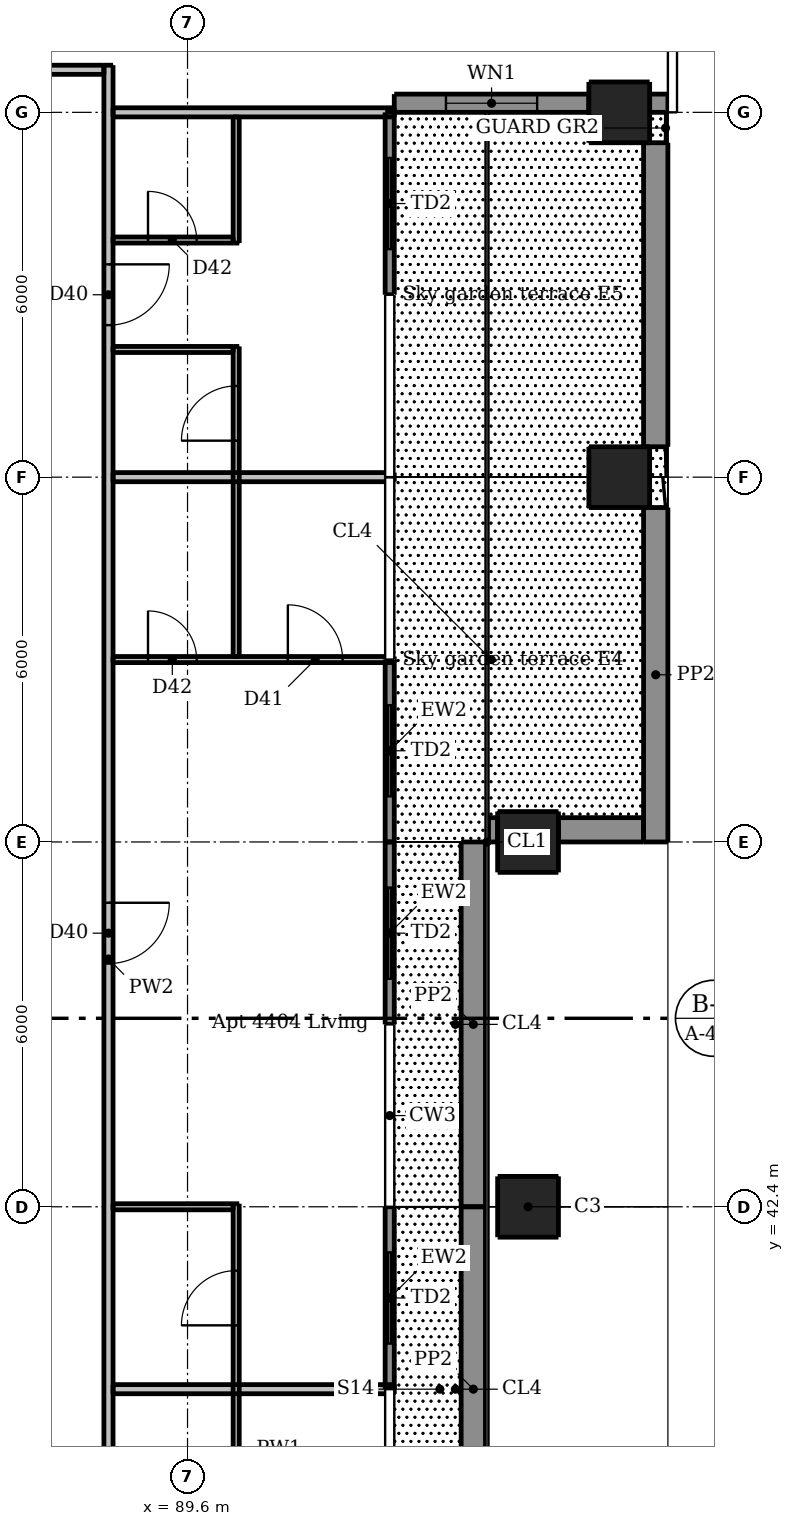
"""IFC4 building model, lengths in metres.
Left out: names, types, materials, properties, quantities, classifications, styles, units other than length and angle.
Written with IfcOpenShell. Run it as: python <this file> out.ifc"""

import sys

from ifc_helpers import new_model, si_unit, direction, frame, frame_2d, origin, origin_2d, place, context, subcontext, project, spatial, rectangle, extrude, element, fill, save


model = new_model("IFC4")
c1 = context("Model", 3, precision=1e-05, world=origin(), true_north=direction((0.0, 1.0)))
c2 = subcontext(c1, "Body", "Model", "MODEL_VIEW")
j1 = project(units=[si_unit("LENGTHUNIT", "METRE"), si_unit("PLANEANGLEUNIT", "RADIAN")], contexts=[c1])
p1 = place(None, origin())
s1 = spatial("IfcSite", under=j1, at=p1, CompositionType="ELEMENT")
p2 = place(p1, origin())
s2 = spatial("IfcBuilding", under=s1, at=p2, CompositionType="ELEMENT")
p3 = place(p2, frame((0.0, 0.0, 164.8)))
s3 = spatial("IfcBuildingStorey", under=s2, at=p3, CompositionType="ELEMENT", Elevation=164.8)
for number, where, z_axis, x_axis in (
    (1, (95.2, 42.4, 0.0), (0.0, 0.0, 1.0), (1.0, 0.0, 0.0)),
    (2, (95.2, 48.4, 0.0), (0.0, 0.0, 1.0), (1.0, 0.0, 0.0)),
    (3, (96.7, 54.4, 0.0), (0.0, 0.0, 1.0), (1.0, 0.0, 0.0)),
):
    element("IfcColumn", number, at=place(p3, frame(where, z_axis=z_axis, x_axis=x_axis)), inside=s3, PredefinedType="COLUMN", context=c2, shape_type="SweptSolid", body=[
        extrude(rectangle(XDim=1.0, YDim=1.0, at=origin_2d()), origin(), (0.0, 0.0, 1.0), 3.3),
    ])
p4 = place(p3, frame((96.7, 60.4, 0.0), z_axis=(0.0, 0.0, 1.0), x_axis=(1.0, 0.0, 0.0)))
e4 = element("IfcColumn", 4, at=p4, inside=s3, PredefinedType="COLUMN", context=c2, shape_type="SweptSolid", body=[
    extrude(rectangle(XDim=1.0, YDim=1.0, at=origin_2d()), origin(), (0.0, 0.0, 1.0), 3.05),
])
p5 = place(p3, frame((93.0, 60.55, 0.0), z_axis=(0.0, 0.0, 1.0), x_axis=(1.0, 0.0, 0.0)))
e5 = element("IfcWall", 5, at=p5, inside=s3, PredefinedType="SOLIDWALL", context=c2, shape_type="SweptSolid", body=[
    extrude(rectangle(XDim=3.2, YDim=0.3, at=frame_2d((1.6, 0.0))), origin(), (0.0, 0.0, 1.0), 3.05),
])
p6 = place(p5, frame((0.85, 0.0, 0.9)))
e6 = element("IfcOpeningElement", 6, at=p6, cuts=e5, PredefinedType="OPENING", context=c2, shape_type="SweptSolid", body=[
    extrude(rectangle(XDim=1.5, YDim=1.5, at=frame_2d((0.75, 0.75))), frame((0.0, 0.16, 0.0), z_axis=(0.0, -1.0, 0.0), x_axis=(1.0, 0.0, 0.0)), (0.0, 0.0, 1.0), 0.32),
])
p7 = place(p3, frame((97.2, 60.55, 0.0), z_axis=(0.0, 0.0, 1.0), x_axis=(1.0, 0.0, 0.0)))
e7 = element("IfcWall", 7, at=p7, inside=s3, PredefinedType="SOLIDWALL", context=c2, shape_type="SweptSolid", body=[
    extrude(rectangle(XDim=0.3, YDim=0.3, at=frame_2d((0.15, 0.0))), origin(), (0.0, 0.0, 1.0), 3.05),
])
p8 = place(p3, frame((92.925, 39.4, 0.0), z_axis=(0.0, 0.0, 1.0), x_axis=(0.0, 1.0, 0.0)))
e8 = element("IfcWall", 8, at=p8, inside=s3, PredefinedType="SOLIDWALL", context=c2, shape_type="SweptSolid", body=[
    extrude(rectangle(XDim=3.0, YDim=0.15, at=frame_2d((1.5, 0.0))), origin(), (0.0, 0.0, 1.0), 3.05),
])
p9 = place(p8, frame((0.75, 0.0, 0.0)))
e9 = element("IfcOpeningElement", 9, at=p9, cuts=e8, PredefinedType="OPENING", context=c2, shape_type="SweptSolid", body=[
    extrude(rectangle(XDim=1.5, YDim=2.4, at=frame_2d((0.75, 1.2))), frame((0.0, 0.085, 0.0), z_axis=(0.0, -1.0, 0.0), x_axis=(1.0, 0.0, 0.0)), (0.0, 0.0, 1.0), 0.17),
])
p10 = place(p3, frame((92.925, 45.4, 0.0), z_axis=(0.0, 0.0, 1.0), x_axis=(0.0, 1.0, 0.0)))
e10 = element("IfcWall", 10, at=p10, inside=s3, PredefinedType="SOLIDWALL", context=c2, shape_type="SweptSolid", body=[
    extrude(rectangle(XDim=3.0, YDim=0.15, at=frame_2d((1.5, 0.0))), origin(), (0.0, 0.0, 1.0), 3.05),
])
p11 = place(p10, frame((0.75, 0.0, 0.0)))
e11 = element("IfcOpeningElement", 11, at=p11, cuts=e10, PredefinedType="OPENING", context=c2, shape_type="SweptSolid", body=[
    extrude(rectangle(XDim=1.5, YDim=2.4, at=frame_2d((0.75, 1.2))), frame((0.0, 0.085, 0.0), z_axis=(0.0, -1.0, 0.0), x_axis=(1.0, 0.0, 0.0)), (0.0, 0.0, 1.0), 0.17),
])
p12 = place(p3, frame((92.925, 48.4, 0.0), z_axis=(0.0, 0.0, 1.0), x_axis=(0.0, 1.0, 0.0)))
e12 = element("IfcWall", 12, at=p12, inside=s3, PredefinedType="SOLIDWALL", context=c2, shape_type="SweptSolid", body=[
    extrude(rectangle(XDim=3.0, YDim=0.15, at=frame_2d((1.5, 0.0))), origin(), (0.0, 0.0, 1.0), 3.05),
])
p13 = place(p12, frame((0.75, 0.0, 0.0)))
e13 = element("IfcOpeningElement", 13, at=p13, cuts=e12, PredefinedType="OPENING", context=c2, shape_type="SweptSolid", body=[
    extrude(rectangle(XDim=1.5, YDim=2.4, at=frame_2d((0.75, 1.2))), frame((0.0, 0.085, 0.0), z_axis=(0.0, -1.0, 0.0), x_axis=(1.0, 0.0, 0.0)), (0.0, 0.0, 1.0), 0.17),
])
p14 = place(p3, frame((92.925, 57.4, 0.0), z_axis=(0.0, 0.0, 1.0), x_axis=(0.0, 1.0, 0.0)))
e14 = element("IfcWall", 14, at=p14, inside=s3, PredefinedType="SOLIDWALL", context=c2, shape_type="SweptSolid", body=[
    extrude(rectangle(XDim=3.0, YDim=0.15, at=frame_2d((1.5, 0.0))), origin(), (0.0, 0.0, 1.0), 3.05),
])
p15 = place(p14, frame((0.75, 0.0, 0.0)))
e15 = element("IfcOpeningElement", 15, at=p15, cuts=e14, PredefinedType="OPENING", context=c2, shape_type="SweptSolid", body=[
    extrude(rectangle(XDim=1.5, YDim=2.4, at=frame_2d((0.75, 1.2))), frame((0.0, 0.085, 0.0), z_axis=(0.0, -1.0, 0.0), x_axis=(1.0, 0.0, 0.0)), (0.0, 0.0, 1.0), 0.17),
])
for number, where, z_axis, x_axis in (
    (16, (94.3, 36.4, 0.03), (0.0, 0.0, 1.0), (0.0, 1.0, 0.0)),
    (17, (94.3, 42.4, 0.03), (0.0, 0.0, 1.0), (0.0, 1.0, 0.0)),
):
    element("IfcWall", number, at=place(p3, frame(where, z_axis=z_axis, x_axis=x_axis)), inside=s3, PredefinedType="PARAPET", context=c2, shape_type="SweptSolid", body=[
        extrude(rectangle(XDim=6.0, YDim=0.4, at=frame_2d((3.0, 0.0))), origin(), (0.0, 0.0, 1.0), 1.1),
    ])
p16 = place(p3, frame((97.3, 48.4, 0.03), z_axis=(0.0, 0.0, 1.0), x_axis=(0.0, 1.0, 0.0)))
e18 = element("IfcWall", 18, at=p16, inside=s3, PredefinedType="PARAPET", context=c2, shape_type="SweptSolid", body=[
    extrude(rectangle(XDim=5.5, YDim=0.4, at=frame_2d((2.75, 0.0))), origin(), (0.0, 0.0, 1.0), 1.1),
])
p17 = place(p3, frame((94.55, 48.6, 0.03), z_axis=(0.0, 0.0, 1.0), x_axis=(1.0, 0.0, 0.0)))
e19 = element("IfcWall", 19, at=p17, inside=s3, PredefinedType="PARAPET", context=c2, shape_type="SweptSolid", body=[
    extrude(rectangle(XDim=0.15, YDim=0.4, at=frame_2d((0.075, 0.0))), origin(), (0.0, 0.0, 1.0), 1.1),
])
p18 = place(p3, frame((95.7, 48.6, 0.03), z_axis=(0.0, 0.0, 1.0), x_axis=(1.0, 0.0, 0.0)))
e20 = element("IfcWall", 20, at=p18, inside=s3, PredefinedType="PARAPET", context=c2, shape_type="SweptSolid", body=[
    extrude(rectangle(XDim=1.4, YDim=0.4, at=frame_2d((0.7, 0.0))), origin(), (0.0, 0.0, 1.0), 1.1),
])
p19 = place(p3, frame((97.3, 54.9, 0.03), z_axis=(0.0, 0.0, 1.0), x_axis=(0.0, 1.0, 0.0)))
e21 = element("IfcWall", 21, at=p19, inside=s3, PredefinedType="PARAPET", context=c2, shape_type="SweptSolid", body=[
    extrude(rectangle(XDim=5.0, YDim=0.4, at=frame_2d((2.5, 0.0))), origin(), (0.0, 0.0, 1.0), 1.1),
])
p20 = place(p3, frame((90.4, 33.45, 0.0), z_axis=(0.0, 0.0, 1.0), x_axis=(0.0, 1.0, 0.0)))
e22 = element("IfcWall", 22, at=p20, inside=s3, PredefinedType="PARTITIONING", context=c2, shape_type="SweptSolid", body=[
    extrude(rectangle(XDim=9.0, YDim=0.1, at=frame_2d((4.5, 0.0))), origin(), (0.0, 0.0, 1.0), 3.05),
])
p21 = place(p20, frame((3.75, 0.0, 0.0)))
e23 = element("IfcOpeningElement", 23, at=p21, cuts=e22, PredefinedType="OPENING", context=c2, shape_type="SweptSolid", body=[
    extrude(rectangle(XDim=0.8, YDim=2.1, at=frame_2d((0.4, 1.05))), frame((0.0, 0.06, 0.0), z_axis=(0.0, -1.0, 0.0), x_axis=(1.0, 0.0, 0.0)), (0.0, 0.0, 1.0), 0.12),
])
p22 = place(p20, frame((7.0, 0.0, 0.0)))
e24 = element("IfcOpeningElement", 24, at=p22, cuts=e22, PredefinedType="OPENING", context=c2, shape_type="SweptSolid", body=[
    extrude(rectangle(XDim=0.9, YDim=2.1, at=frame_2d((0.45, 1.05))), frame((0.0, 0.06, 0.0), z_axis=(0.0, -1.0, 0.0), x_axis=(1.0, 0.0, 0.0)), (0.0, 0.0, 1.0), 0.12),
])
p23 = place(p3, frame((90.4, 51.45, 0.0), z_axis=(0.0, 0.0, 1.0), x_axis=(0.0, 1.0, 0.0)))
e25 = element("IfcWall", 25, at=p23, inside=s3, PredefinedType="PARTITIONING", context=c2, shape_type="SweptSolid", body=[
    extrude(rectangle(XDim=5.1, YDim=0.1, at=frame_2d((2.55, 0.0))), origin(), (0.0, 0.0, 1.0), 3.05),
])
p24 = place(p23, frame((3.55, 0.0, 0.0)))
e26 = element("IfcOpeningElement", 26, at=p24, cuts=e25, PredefinedType="OPENING", context=c2, shape_type="SweptSolid", body=[
    extrude(rectangle(XDim=0.9, YDim=2.1, at=frame_2d((0.45, 1.05))), frame((0.0, 0.06, 0.0), z_axis=(0.0, -1.0, 0.0), x_axis=(1.0, 0.0, 0.0)), (0.0, 0.0, 1.0), 0.12),
])
p25 = place(p3, frame((90.4, 58.25, 0.0), z_axis=(0.0, 0.0, 1.0), x_axis=(0.0, 1.0, 0.0)))
e27 = element("IfcWall", 27, at=p25, inside=s3, PredefinedType="PARTITIONING", context=c2, shape_type="SweptSolid", body=[
    extrude(rectangle(XDim=2.075, YDim=0.1, at=frame_2d((1.038, 0.0))), origin(), (0.0, 0.0, 1.0), 3.05),
])
p26 = place(p3, frame((88.375, 58.3, 0.0), z_axis=(0.0, 0.0, 1.0), x_axis=(1.0, 0.0, 0.0)))
e28 = element("IfcWall", 28, at=p26, inside=s3, PredefinedType="PARTITIONING", context=c2, shape_type="SweptSolid", body=[
    extrude(rectangle(XDim=1.975, YDim=0.1, at=frame_2d((0.988, 0.0))), origin(), (0.0, 0.0, 1.0), 3.05),
])
p27 = place(p26, frame((0.575, 0.0, 0.0)))
e29 = element("IfcOpeningElement", 29, at=p27, cuts=e28, PredefinedType="OPENING", context=c2, shape_type="SweptSolid", body=[
    extrude(rectangle(XDim=0.8, YDim=2.1, at=frame_2d((0.4, 1.05))), frame((0.0, 0.06, 0.0), z_axis=(0.0, -1.0, 0.0), x_axis=(1.0, 0.0, 0.0)), (0.0, 0.0, 1.0), 0.12),
])
p28 = place(p3, frame((88.375, 56.5, 0.0), z_axis=(0.0, 0.0, 1.0), x_axis=(1.0, 0.0, 0.0)))
e30 = element("IfcWall", 30, at=p28, inside=s3, PredefinedType="PARTITIONING", context=c2, shape_type="SweptSolid", body=[
    extrude(rectangle(XDim=1.975, YDim=0.1, at=frame_2d((0.988, 0.0))), origin(), (0.0, 0.0, 1.0), 3.05),
])
p29 = place(p3, frame((88.375, 51.4, 0.0), z_axis=(0.0, 0.0, 1.0), x_axis=(1.0, 0.0, 0.0)))
e31 = element("IfcWall", 31, at=p29, inside=s3, PredefinedType="PARTITIONING", context=c2, shape_type="SweptSolid", body=[
    extrude(rectangle(XDim=4.625, YDim=0.1, at=frame_2d((2.312, 0.0))), origin(), (0.0, 0.0, 1.0), 3.05),
])
p30 = place(p29, frame((2.875, 0.0, 0.0)))
e32 = element("IfcOpeningElement", 32, at=p30, cuts=e31, PredefinedType="OPENING", context=c2, shape_type="SweptSolid", body=[
    extrude(rectangle(XDim=0.9, YDim=2.1, at=frame_2d((0.45, 1.05))), frame((0.0, 0.06, 0.0), z_axis=(0.0, -1.0, 0.0), x_axis=(1.0, 0.0, 0.0)), (0.0, 0.0, 1.0), 0.12),
])
p31 = place(p29, frame((0.575, 0.0, 0.0)))
e33 = element("IfcOpeningElement", 33, at=p31, cuts=e31, PredefinedType="OPENING", context=c2, shape_type="SweptSolid", body=[
    extrude(rectangle(XDim=0.8, YDim=2.1, at=frame_2d((0.4, 1.05))), frame((0.0, 0.06, 0.0), z_axis=(0.0, -1.0, 0.0), x_axis=(1.0, 0.0, 0.0)), (0.0, 0.0, 1.0), 0.12),
])
p32 = place(p3, frame((88.375, 42.4, 0.0), z_axis=(0.0, 0.0, 1.0), x_axis=(1.0, 0.0, 0.0)))
e34 = element("IfcWall", 34, at=p32, inside=s3, PredefinedType="PARTITIONING", context=c2, shape_type="SweptSolid", body=[
    extrude(rectangle(XDim=1.975, YDim=0.1, at=frame_2d((0.988, 0.0))), origin(), (0.0, 0.0, 1.0), 2.59),
])
p33 = place(p3, frame((88.3, 61.175, 0.0), z_axis=(0.0, 0.0, 1.0), x_axis=(0.0, -1.0, 0.0)))
e35 = element("IfcWall", 35, at=p33, inside=s3, PredefinedType="PARTITIONING", context=c2, shape_type="SweptSolid", body=[
    extrude(rectangle(XDim=29.4, YDim=0.15, at=frame_2d((14.7, 0.0))), origin(), (0.0, 0.0, 1.0), 3.05),
])
p34 = place(p33, frame((28.125, 0.0, 0.0)))
e36 = element("IfcOpeningElement", 36, at=p34, cuts=e35, PredefinedType="OPENING", context=c2, shape_type="SweptSolid", body=[
    extrude(rectangle(XDim=1.0, YDim=2.1, at=frame_2d((0.5, 1.05))), frame((0.0, 0.085, 0.0), z_axis=(0.0, -1.0, 0.0), x_axis=(1.0, 0.0, 0.0)), (0.0, 0.0, 1.0), 0.17),
])
p35 = place(p33, frame((13.775, 0.0, 0.0)))
e37 = element("IfcOpeningElement", 37, at=p35, cuts=e35, PredefinedType="OPENING", context=c2, shape_type="SweptSolid", body=[
    extrude(rectangle(XDim=1.0, YDim=2.1, at=frame_2d((0.5, 1.05))), frame((0.0, 0.085, 0.0), z_axis=(0.0, -1.0, 0.0), x_axis=(1.0, 0.0, 0.0)), (0.0, 0.0, 1.0), 0.17),
])
p36 = place(p33, frame((3.275, 0.0, 0.0)))
e38 = element("IfcOpeningElement", 38, at=p36, cuts=e35, PredefinedType="OPENING", context=c2, shape_type="SweptSolid", body=[
    extrude(rectangle(XDim=1.0, YDim=2.1, at=frame_2d((0.5, 1.05))), frame((0.0, 0.085, 0.0), z_axis=(0.0, -1.0, 0.0), x_axis=(1.0, 0.0, 0.0)), (0.0, 0.0, 1.0), 0.17),
])
p37 = place(p3, frame((58.975, 61.1, 0.0), z_axis=(0.0, 0.0, 1.0), x_axis=(1.0, 0.0, 0.0)))
e39 = element("IfcWall", 39, at=p37, inside=s3, PredefinedType="PARTITIONING", context=c2, shape_type="SweptSolid", body=[
    extrude(rectangle(XDim=29.25, YDim=0.15, at=frame_2d((14.625, 0.0))), origin(), (0.0, 0.0, 1.0), 3.05),
])
p38 = place(p37, frame((9.125, 0.0, 0.0)))
e40 = element("IfcOpeningElement", 40, at=p38, cuts=e39, PredefinedType="OPENING", context=c2, shape_type="SweptSolid", body=[
    extrude(rectangle(XDim=1.0, YDim=2.1, at=frame_2d((0.5, 1.05))), frame((0.0, 0.085, 0.0), z_axis=(0.0, -1.0, 0.0), x_axis=(1.0, 0.0, 0.0)), (0.0, 0.0, 1.0), 0.17),
])
p39 = place(p37, frame((26.475, 0.0, 0.0)))
e41 = element("IfcOpeningElement", 41, at=p39, cuts=e39, PredefinedType="OPENING", context=c2, shape_type="SweptSolid", body=[
    extrude(rectangle(XDim=1.0, YDim=2.1, at=frame_2d((0.5, 1.05))), frame((0.0, 0.085, 0.0), z_axis=(0.0, -1.0, 0.0), x_axis=(1.0, 0.0, 0.0)), (0.0, 0.0, 1.0), 0.17),
])
p40 = place(p3, frame((88.375, 60.4, 0.0), z_axis=(0.0, 0.0, 1.0), x_axis=(1.0, 0.0, 0.0)))
e42 = element("IfcWall", 42, at=p40, inside=s3, PredefinedType="PARTITIONING", context=c2, shape_type="SweptSolid", body=[
    extrude(rectangle(XDim=4.625, YDim=0.15, at=frame_2d((2.312, 0.0))), origin(), (0.0, 0.0, 1.0), 2.647),
])
p41 = place(p3, frame((88.375, 54.4, 0.0), z_axis=(0.0, 0.0, 1.0), x_axis=(1.0, 0.0, 0.0)))
e43 = element("IfcWall", 43, at=p41, inside=s3, PredefinedType="PARTITIONING", context=c2, shape_type="SweptSolid", body=[
    extrude(rectangle(XDim=4.625, YDim=0.15, at=frame_2d((2.312, 0.0))), origin(), (0.0, 0.0, 1.0), 2.516),
])
p42 = place(p3, frame((88.375, 39.4, 0.0), z_axis=(0.0, 0.0, 1.0), x_axis=(1.0, 0.0, 0.0)))
e44 = element("IfcWall", 44, at=p42, inside=s3, PredefinedType="PARTITIONING", context=c2, shape_type="SweptSolid", body=[
    extrude(rectangle(XDim=4.625, YDim=0.15, at=frame_2d((2.312, 0.0))), origin(), (0.0, 0.0, 1.0), 3.05),
])
p43 = place(p6, origin())
e45 = element("IfcWindow", 45, at=p43, inside=s3, PartitioningType="DOUBLE_PANEL_VERTICAL", PredefinedType="WINDOW", context=c2, shape_type="SweptSolid", body=[
    extrude(rectangle(XDim=1.5, YDim=1.5, at=frame_2d((0.75, 0.75))), frame((0.0, 0.03, 0.0), z_axis=(0.0, -1.0, 0.0), x_axis=(1.0, 0.0, 0.0)), (0.0, 0.0, 1.0), 0.06),
])
fill(e6, e45)
p44 = place(p9, origin())
e46 = element("IfcDoor", 46, at=p44, inside=s3, OperationType="DOUBLE_DOOR_SLIDING", PredefinedType="DOOR", context=c2, shape_type="SweptSolid", body=[
    extrude(rectangle(XDim=1.5, YDim=2.4, at=frame_2d((0.75, 1.2))), frame((0.0, 0.025, 0.0), z_axis=(0.0, -1.0, 0.0), x_axis=(1.0, 0.0, 0.0)), (0.0, 0.0, 1.0), 0.05),
])
fill(e9, e46)
p45 = place(p11, origin())
e47 = element("IfcDoor", 47, at=p45, inside=s3, OperationType="DOUBLE_DOOR_SLIDING", PredefinedType="DOOR", context=c2, shape_type="SweptSolid", body=[
    extrude(rectangle(XDim=1.5, YDim=2.4, at=frame_2d((0.75, 1.2))), frame((0.0, 0.025, 0.0), z_axis=(0.0, -1.0, 0.0), x_axis=(1.0, 0.0, 0.0)), (0.0, 0.0, 1.0), 0.05),
])
fill(e11, e47)
p46 = place(p13, origin())
e48 = element("IfcDoor", 48, at=p46, inside=s3, OperationType="DOUBLE_DOOR_SLIDING", PredefinedType="DOOR", context=c2, shape_type="SweptSolid", body=[
    extrude(rectangle(XDim=1.5, YDim=2.4, at=frame_2d((0.75, 1.2))), frame((0.0, 0.025, 0.0), z_axis=(0.0, -1.0, 0.0), x_axis=(1.0, 0.0, 0.0)), (0.0, 0.0, 1.0), 0.05),
])
fill(e13, e48)
p47 = place(p15, origin())
e49 = element("IfcDoor", 49, at=p47, inside=s3, OperationType="DOUBLE_DOOR_SLIDING", PredefinedType="DOOR", context=c2, shape_type="SweptSolid", body=[
    extrude(rectangle(XDim=1.5, YDim=2.4, at=frame_2d((0.75, 1.2))), frame((0.0, 0.025, 0.0), z_axis=(0.0, -1.0, 0.0), x_axis=(1.0, 0.0, 0.0)), (0.0, 0.0, 1.0), 0.05),
])
fill(e15, e49)
p48 = place(p35, origin())
e50 = element("IfcDoor", 50, at=p48, inside=s3, OperationType="SINGLE_SWING_LEFT", PredefinedType="DOOR", context=c2, shape_type="SweptSolid", body=[
    extrude(rectangle(XDim=1.0, YDim=2.1, at=frame_2d((0.5, 1.05))), frame((0.0, 0.025, 0.0), z_axis=(0.0, -1.0, 0.0), x_axis=(1.0, 0.0, 0.0)), (0.0, 0.0, 1.0), 0.05),
])
fill(e37, e50)
p49 = place(p22, origin())
e51 = element("IfcDoor", 51, at=p49, inside=s3, OperationType="SINGLE_SWING_LEFT", PredefinedType="DOOR", context=c2, shape_type="SweptSolid", body=[
    extrude(rectangle(XDim=0.9, YDim=2.1, at=frame_2d((0.45, 1.05))), frame((0.0, 0.025, 0.0), z_axis=(0.0, -1.0, 0.0), x_axis=(1.0, 0.0, 0.0)), (0.0, 0.0, 1.0), 0.05),
])
fill(e24, e51)
p50 = place(p30, origin())
e52 = element("IfcDoor", 52, at=p50, inside=s3, OperationType="SINGLE_SWING_LEFT", PredefinedType="DOOR", context=c2, shape_type="SweptSolid", body=[
    extrude(rectangle(XDim=0.9, YDim=2.1, at=frame_2d((0.45, 1.05))), frame((0.0, 0.025, 0.0), z_axis=(0.0, -1.0, 0.0), x_axis=(1.0, 0.0, 0.0)), (0.0, 0.0, 1.0), 0.05),
])
fill(e32, e52)
p51 = place(p31, origin())
e53 = element("IfcDoor", 53, at=p51, inside=s3, OperationType="SINGLE_SWING_LEFT", PredefinedType="DOOR", context=c2, shape_type="SweptSolid", body=[
    extrude(rectangle(XDim=0.8, YDim=2.1, at=frame_2d((0.4, 1.05))), frame((0.0, 0.025, 0.0), z_axis=(0.0, -1.0, 0.0), x_axis=(1.0, 0.0, 0.0)), (0.0, 0.0, 1.0), 0.05),
])
fill(e33, e53)
p52 = place(p36, origin())
e54 = element("IfcDoor", 54, at=p52, inside=s3, OperationType="SINGLE_SWING_LEFT", PredefinedType="DOOR", context=c2, shape_type="SweptSolid", body=[
    extrude(rectangle(XDim=1.0, YDim=2.1, at=frame_2d((0.5, 1.05))), frame((0.0, 0.025, 0.0), z_axis=(0.0, -1.0, 0.0), x_axis=(1.0, 0.0, 0.0)), (0.0, 0.0, 1.0), 0.05),
])
fill(e38, e54)
p53 = place(p24, origin())
e55 = element("IfcDoor", 55, at=p53, inside=s3, OperationType="SINGLE_SWING_LEFT", PredefinedType="DOOR", context=c2, shape_type="SweptSolid", body=[
    extrude(rectangle(XDim=0.9, YDim=2.1, at=frame_2d((0.45, 1.05))), frame((0.0, 0.025, 0.0), z_axis=(0.0, -1.0, 0.0), x_axis=(1.0, 0.0, 0.0)), (0.0, 0.0, 1.0), 0.05),
])
fill(e26, e55)
p54 = place(p27, origin())
e56 = element("IfcDoor", 56, at=p54, inside=s3, OperationType="SINGLE_SWING_LEFT", PredefinedType="DOOR", context=c2, shape_type="SweptSolid", body=[
    extrude(rectangle(XDim=0.8, YDim=2.1, at=frame_2d((0.4, 1.05))), frame((0.0, 0.025, 0.0), z_axis=(0.0, -1.0, 0.0), x_axis=(1.0, 0.0, 0.0)), (0.0, 0.0, 1.0), 0.05),
])
fill(e29, e56)
save(model, sys.argv[1])
